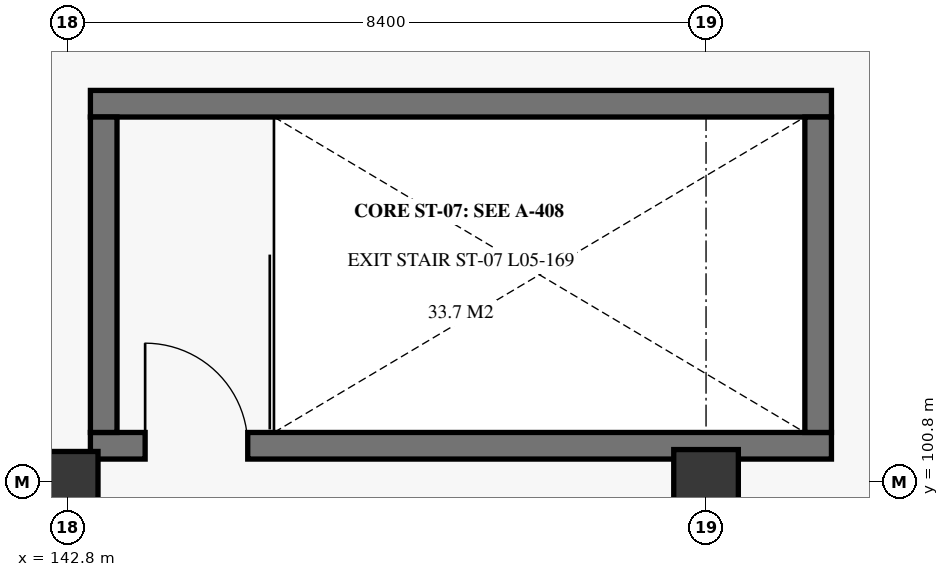
"""IFC4 building model, lengths in metres.
Left out: names, types, materials, properties, quantities, classifications, styles, units other than length and angle.
Written with IfcOpenShell. Run it as: python <this file> out.ifc"""

import sys

from ifc_helpers import new_model, si_unit, direction, frame, frame_2d, origin, origin_2d, place, context, subcontext, project, spatial, rectangle, extrude, element, fill, save


model = new_model("IFC4")
c1 = context("Model", 3, precision=1e-05, world=origin(), true_north=direction((0.0, 1.0)))
c2 = subcontext(c1, "Body", "Model", "MODEL_VIEW")
j1 = project(units=[si_unit("LENGTHUNIT", "METRE"), si_unit("PLANEANGLEUNIT", "RADIAN")], contexts=[c1])
p1 = place(None, origin())
s1 = spatial("IfcSite", under=j1, at=p1, CompositionType="ELEMENT")
p2 = place(p1, origin())
s2 = spatial("IfcBuilding", under=s1, at=p2, CompositionType="ELEMENT")
p3 = place(p2, frame((0.0, 0.0, 22.2)))
s3 = spatial("IfcBuildingStorey", under=s2, at=p3, CompositionType="ELEMENT", Elevation=22.2)
p4 = place(p3, frame((142.8, 100.8, 0.0), z_axis=(0.0, 0.0, 1.0), x_axis=(1.0, 0.0, 0.0)))
e1 = element("IfcColumn", 1, at=p4, inside=s3, PredefinedType="COLUMN", context=c2, shape_type="SweptSolid", body=[
    extrude(rectangle(XDim=0.8, YDim=0.8, at=origin_2d()), origin(), (0.0, 0.0, 1.0), 4.22),
])
p5 = place(p3, frame((151.2, 100.8, 0.0), z_axis=(0.0, 0.0, 1.0), x_axis=(1.0, 0.0, 0.0)))
e2 = element("IfcColumn", 2, at=p5, inside=s3, PredefinedType="COLUMN", context=c2, shape_type="SweptSolid", body=[
    extrude(rectangle(XDim=0.85, YDim=0.85, at=origin_2d()), origin(), (0.0, 0.0, 1.0), 4.22),
])
p6 = place(p3, frame((143.1, 101.275, 0.0), z_axis=(0.0, 0.0, 1.0), x_axis=(1.0, 0.0, 0.0)))
e3 = element("IfcWall", 3, at=p6, inside=s3, PredefinedType="SHEAR", context=c2, shape_type="SweptSolid", body=[
    extrude(rectangle(XDim=9.75, YDim=0.35, at=frame_2d((4.875, 0.0))), origin(), (0.0, 0.0, 1.0), 4.22),
])
p7 = place(p6, frame((0.72, 0.0, 0.0)))
e4 = element("IfcOpeningElement", 4, at=p7, cuts=e3, PredefinedType="OPENING", context=c2, shape_type="SweptSolid", body=[
    extrude(rectangle(XDim=1.35, YDim=2.25, at=frame_2d((0.675, 1.125))), frame((0.0, 0.185, 0.0), z_axis=(0.0, -1.0, 0.0), x_axis=(1.0, 0.0, 0.0)), (0.0, 0.0, 1.0), 0.37),
])
p8 = place(p3, frame((143.1, 105.775, 0.0), z_axis=(0.0, 0.0, 1.0), x_axis=(1.0, 0.0, 0.0)))
e5 = element("IfcWall", 5, at=p8, inside=s3, PredefinedType="SHEAR", context=c2, shape_type="SweptSolid", body=[
    extrude(rectangle(XDim=9.75, YDim=0.35, at=frame_2d((4.875, 0.0))), origin(), (0.0, 0.0, 1.0), 4.22),
])
for number, where, z_axis, x_axis in (
    (6, (143.275, 101.45, 0.0), (0.0, 0.0, 1.0), (0.0, 1.0, 0.0)),
    (7, (152.675, 101.45, 0.0), (0.0, 0.0, 1.0), (0.0, 1.0, 0.0)),
):
    element("IfcWall", number, at=place(p3, frame(where, z_axis=z_axis, x_axis=x_axis)), inside=s3, PredefinedType="SHEAR", context=c2, shape_type="SweptSolid", body=[
        extrude(rectangle(XDim=4.15, YDim=0.35, at=frame_2d((2.075, 0.0))), origin(), (0.0, 0.0, 1.0), 4.22),
    ])
p9 = place(p7, origin())
e8 = element("IfcDoor", 8, at=p9, inside=s3, OperationType="SINGLE_SWING_LEFT", PredefinedType="DOOR", context=c2, shape_type="SweptSolid", body=[
    extrude(rectangle(XDim=1.35, YDim=2.25, at=frame_2d((0.675, 1.125))), frame((0.0, 0.025, 0.0), z_axis=(0.0, -1.0, 0.0), x_axis=(1.0, 0.0, 0.0)), (0.0, 0.0, 1.0), 0.05),
])
fill(e4, e8)
save(model, sys.argv[1])
